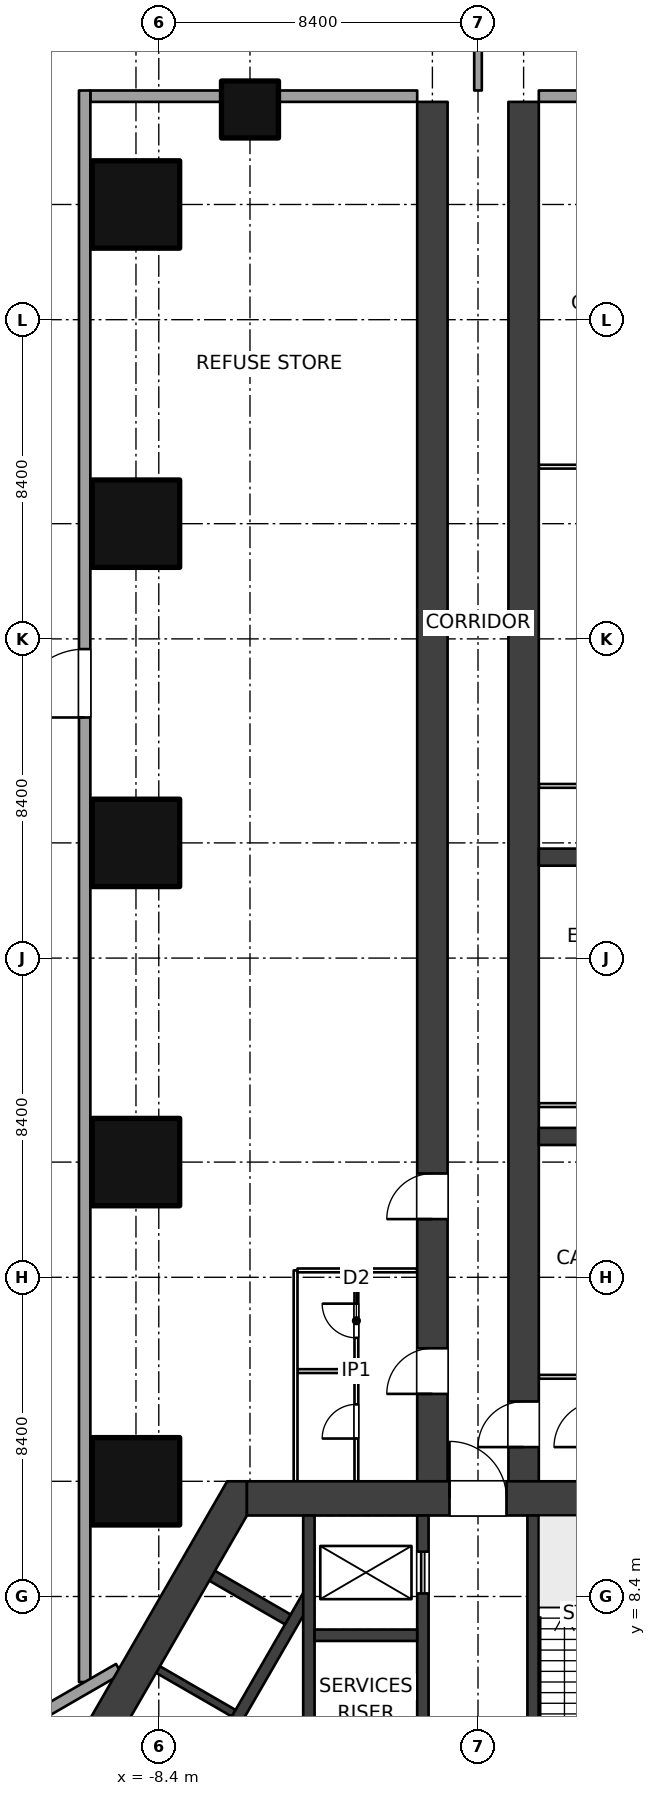
"""IFC4 building model, lengths in metres.
Left out: names, types, materials, properties, quantities, classifications, styles, units other than length and angle.
Written with IfcOpenShell. Run it as: python <this file> out.ifc"""

import sys

from ifc_helpers import new_model, si_unit, direction, frame, frame_2d, origin, origin_2d, place, context, subcontext, project, spatial, polyline, rectangle, outline, extrude, element, fill, save


model = new_model("IFC4")
c1 = context("Model", 3, precision=1e-05, world=origin(), true_north=direction((0.0, 1.0)))
c2 = subcontext(c1, "Body", "Model", "MODEL_VIEW")
j1 = project(units=[si_unit("LENGTHUNIT", "METRE"), si_unit("PLANEANGLEUNIT", "RADIAN")], contexts=[c1])
p1 = place(None, origin())
s1 = spatial("IfcSite", under=j1, at=p1, CompositionType="ELEMENT")
p2 = place(p1, origin())
s2 = spatial("IfcBuilding", under=s1, at=p2, CompositionType="ELEMENT")
p3 = place(p2, frame((0.0, 0.0, -3.5)))
s3 = spatial("IfcBuildingStorey", under=s2, at=p3, CompositionType="ELEMENT", Elevation=-3.5)
for number, where, z_axis, x_axis in (
    (1, (-9.0, 11.432, 0.0), (0.0, 0.0, 1.0), (1.0, 0.0, 0.0)),
    (2, (-9.0, 19.832, 0.0), (0.0, 0.0, 1.0), (1.0, 0.0, 0.0)),
    (3, (-9.0, 28.231, 0.0), (0.0, 0.0, 1.0), (1.0, 0.0, 0.0)),
    (4, (-9.0, 36.632, 0.0), (0.0, 0.0, 1.0), (1.0, 0.0, 0.0)),
    (5, (-9.0, 45.031, 0.0), (0.0, 0.0, 1.0), (1.0, 0.0, 0.0)),
):
    element("IfcColumn", number, at=place(p3, frame(where, z_axis=z_axis, x_axis=x_axis)), inside=s3, PredefinedType="COLUMN", context=c2, shape_type="SweptSolid", body=[
        extrude(rectangle(XDim=2.3, YDim=2.3, at=origin_2d()), origin(), (0.0, 0.0, 1.0), 3.5),
    ])
p4 = place(p3, frame((-6.0, 47.531, 0.0), z_axis=(0.0, 0.0, 1.0), x_axis=(1.0, 0.0, 0.0)))
e6 = element("IfcColumn", 6, at=p4, inside=s3, PredefinedType="COLUMN", context=c2, shape_type="SweptSolid", body=[
    extrude(rectangle(XDim=1.5, YDim=1.5, at=origin_2d()), origin(), (0.0, 0.0, 1.0), 3.5),
])
p5 = place(p3, frame((-6.08, 10.981, 0.0), z_axis=(0.0, 0.0, 1.0), x_axis=(1.0, 0.0, 0.0)))
e7 = element("IfcWall", 7, at=p5, inside=s3, PredefinedType="SHEAR", context=c2, shape_type="SweptSolid", body=[
    extrude(rectangle(XDim=12.161, YDim=0.9, at=frame_2d((6.08, 0.0))), origin(), (0.0, 0.0, 1.0), 3.5),
])
p6 = place(p5, frame((5.33, 0.0, 0.0)))
e8 = element("IfcOpeningElement", 8, at=p6, cuts=e7, PredefinedType="OPENING", context=c2, shape_type="SweptSolid", body=[
    extrude(rectangle(XDim=1.5, YDim=2.1, at=frame_2d((0.75, 1.05))), frame((0.0, 0.46, 0.0), z_axis=(0.0, -1.0, 0.0), x_axis=(1.0, 0.0, 0.0)), (0.0, 0.0, 1.0), 0.92),
])
p7 = place(p3, origin())
e9 = element("IfcWall", 9, at=p7, inside=s3, PredefinedType="SHEAR", context=c2, shape_type="SweptSolid", body=[
    extrude(outline(polyline([(-6.6, 11.432), (-13.2, 0.0), (-12.94, -0.45), (-12.161, 0.0), (-6.08, 10.531), (-6.08, 11.432), (-6.6, 11.432)])), origin(), (0.0, 0.0, 1.0), 3.5),
])
p8 = place(p3, frame((1.45, 3.63, 0.0), z_axis=(0.0, 0.0, 1.0), x_axis=(0.0, 1.0, 0.0)))
e10 = element("IfcWall", 10, at=p8, inside=s3, PredefinedType="SHEAR", context=c2, shape_type="SweptSolid", body=[
    extrude(rectangle(XDim=6.902, YDim=0.3, at=frame_2d((3.451, 0.0))), origin(), (0.0, 0.0, 1.0), 3.5),
])
p9 = place(p8, frame((0.25, 0.0, 0.0)))
e11 = element("IfcOpeningElement", 11, at=p9, cuts=e10, PredefinedType="OPENING", context=c2, shape_type="SweptSolid", body=[
    extrude(rectangle(XDim=1.0, YDim=2.1, at=frame_2d((0.5, 1.05))), frame((0.0, 0.16, 0.0), z_axis=(0.0, -1.0, 0.0), x_axis=(1.0, 0.0, 0.0)), (0.0, 0.0, 1.0), 0.32),
])
p10 = place(p3, frame((-1.45, 3.63, 0.0), z_axis=(0.0, 0.0, 1.0), x_axis=(0.0, 1.0, 0.0)))
e12 = element("IfcWall", 12, at=p10, inside=s3, PredefinedType="SHEAR", context=c2, shape_type="SweptSolid", body=[
    extrude(rectangle(XDim=6.902, YDim=0.3, at=frame_2d((3.451, 0.0))), origin(), (0.0, 0.0, 1.0), 3.5),
])
p11 = place(p10, frame((4.85, 0.0, 0.0)))
e13 = element("IfcOpeningElement", 13, at=p11, cuts=e12, PredefinedType="OPENING", context=c2, shape_type="SweptSolid", body=[
    extrude(rectangle(XDim=1.1, YDim=2.1, at=frame_2d((0.55, 1.05))), frame((0.0, 0.16, 0.0), z_axis=(0.0, -1.0, 0.0), x_axis=(1.0, 0.0, 0.0)), (0.0, 0.0, 1.0), 0.32),
])
p12 = place(p3, frame((-4.45, 3.63, 0.0), z_axis=(0.0, 0.0, 1.0), x_axis=(0.0, 1.0, 0.0)))
e14 = element("IfcWall", 14, at=p12, inside=s3, PredefinedType="SHEAR", context=c2, shape_type="SweptSolid", body=[
    extrude(rectangle(XDim=6.902, YDim=0.3, at=frame_2d((3.451, 0.0))), origin(), (0.0, 0.0, 1.0), 3.5),
])
p13 = place(p3, frame((-4.3, 7.38, 0.0), z_axis=(0.0, 0.0, 1.0), x_axis=(1.0, 0.0, 0.0)))
e15 = element("IfcWall", 15, at=p13, inside=s3, PredefinedType="SHEAR", context=c2, shape_type="SweptSolid", body=[
    extrude(rectangle(XDim=2.7, YDim=0.3, at=frame_2d((1.35, 0.0))), origin(), (0.0, 0.0, 1.0), 3.5),
])
p14 = place(p3, frame((-9.548, -0.374, 0.0), z_axis=(0.0, 0.0, 1.0), x_axis=(0.500002290144, 0.866024081565, 0.0)))
e16 = element("IfcWall", 16, at=p14, inside=s3, PredefinedType="SHEAR", context=c2, shape_type="SweptSolid", body=[
    extrude(rectangle(XDim=10.195, YDim=0.3, at=frame_2d((5.098, 0.0))), origin(), (0.0, 0.0, 1.0), 3.5),
])
p15 = place(p3, frame((-5.004, 7.796, 0.0), z_axis=(0.0, 0.0, 1.0), x_axis=(-0.866053019151, 0.499952165731, 0.0)))
e17 = element("IfcWall", 17, at=p15, inside=s3, PredefinedType="SHEAR", context=c2, shape_type="SweptSolid", body=[
    extrude(rectangle(XDim=2.3, YDim=0.3, at=frame_2d((1.15, 0.0))), origin(), (0.0, 0.0, 1.0), 3.5),
])
p16 = place(p3, frame((-6.429, 5.328, 0.0), z_axis=(0.0, 0.0, 1.0), x_axis=(-0.866007057882, 0.500031774688, 0.0)))
e18 = element("IfcWall", 18, at=p16, inside=s3, PredefinedType="SHEAR", context=c2, shape_type="SweptSolid", body=[
    extrude(rectangle(XDim=2.3, YDim=0.2, at=frame_2d((1.15, 0.0))), origin(), (0.0, 0.0, 1.0), 3.5),
])
p17 = place(p3, frame((-1.2, 10.981, 0.0), z_axis=(0.0, 0.0, 1.0), x_axis=(0.0, 1.0, 0.0)))
e19 = element("IfcWall", 19, at=p17, inside=s3, PredefinedType="SHEAR", context=c2, shape_type="SweptSolid", body=[
    extrude(rectangle(XDim=36.75, YDim=0.8, at=frame_2d((18.375, 0.0))), origin(), (0.0, 0.0, 1.0), 3.5),
])
p18 = place(p17, frame((2.75, 0.0, 0.0)))
e20 = element("IfcOpeningElement", 20, at=p18, cuts=e19, PredefinedType="OPENING", context=c2, shape_type="SweptSolid", body=[
    extrude(rectangle(XDim=1.2, YDim=2.1, at=frame_2d((0.6, 1.05))), frame((0.0, 0.41, 0.0), z_axis=(0.0, -1.0, 0.0), x_axis=(1.0, 0.0, 0.0)), (0.0, 0.0, 1.0), 0.82),
])
p19 = place(p17, frame((7.35, 0.0, 0.0)))
e21 = element("IfcOpeningElement", 21, at=p19, cuts=e19, PredefinedType="OPENING", context=c2, shape_type="SweptSolid", body=[
    extrude(rectangle(XDim=1.2, YDim=2.1, at=frame_2d((0.6, 1.05))), frame((0.0, 0.41, 0.0), z_axis=(0.0, -1.0, 0.0), x_axis=(1.0, 0.0, 0.0)), (0.0, 0.0, 1.0), 0.82),
])
p20 = place(p3, frame((1.2, 10.981, 0.0), z_axis=(0.0, 0.0, 1.0), x_axis=(0.0, 1.0, 0.0)))
e22 = element("IfcWall", 22, at=p20, inside=s3, PredefinedType="SHEAR", context=c2, shape_type="SweptSolid", body=[
    extrude(rectangle(XDim=36.75, YDim=0.8, at=frame_2d((18.375, 0.0))), origin(), (0.0, 0.0, 1.0), 3.5),
])
p21 = place(p20, frame((1.35, 0.0, 0.0)))
e23 = element("IfcOpeningElement", 23, at=p21, cuts=e22, PredefinedType="OPENING", context=c2, shape_type="SweptSolid", body=[
    extrude(rectangle(XDim=1.2, YDim=2.1, at=frame_2d((0.6, 1.05))), frame((0.0, 0.41, 0.0), z_axis=(0.0, -1.0, 0.0), x_axis=(1.0, 0.0, 0.0)), (0.0, 0.0, 1.0), 0.82),
])
p22 = place(p3, frame((-3.2, 11.432, 0.0), z_axis=(0.0, 0.0, 1.0), x_axis=(0.0, 1.0, 0.0)))
e24 = element("IfcWall", 24, at=p22, inside=s3, PredefinedType="PARTITIONING", context=c2, shape_type="SweptSolid", body=[
    extrude(rectangle(XDim=5.6, YDim=0.1, at=frame_2d((2.8, 0.0))), origin(), (0.0, 0.0, 1.0), 3.15),
])
p23 = place(p22, frame((1.125, 0.0, 0.0)))
e25 = element("IfcOpeningElement", 25, at=p23, cuts=e24, PredefinedType="OPENING", context=c2, shape_type="SweptSolid", body=[
    extrude(rectangle(XDim=0.9, YDim=2.1, at=frame_2d((0.45, 1.05))), frame((0.0, 0.06, 0.0), z_axis=(0.0, -1.0, 0.0), x_axis=(1.0, 0.0, 0.0)), (0.0, 0.0, 1.0), 0.12),
])
p24 = place(p22, frame((3.775, 0.0, 0.0)))
e26 = element("IfcOpeningElement", 26, at=p24, cuts=e24, PredefinedType="OPENING", context=c2, shape_type="SweptSolid", body=[
    extrude(rectangle(XDim=0.9, YDim=2.1, at=frame_2d((0.45, 1.05))), frame((0.0, 0.06, 0.0), z_axis=(0.0, -1.0, 0.0), x_axis=(1.0, 0.0, 0.0)), (0.0, 0.0, 1.0), 0.12),
])
p25 = place(p3, frame((-3.25, 14.332, 0.0), z_axis=(0.0, 0.0, 1.0), x_axis=(-1.0, 0.0, 0.0)))
e27 = element("IfcWall", 27, at=p25, inside=s3, PredefinedType="PARTITIONING", context=c2, shape_type="SweptSolid", body=[
    extrude(rectangle(XDim=1.5, YDim=0.1, at=frame_2d((0.75, 0.0))), origin(), (0.0, 0.0, 1.0), 3.15),
])
p26 = place(p3, frame((-4.8, 11.432, 0.0), z_axis=(0.0, 0.0, 1.0), x_axis=(0.0, 1.0, 0.0)))
e28 = element("IfcWall", 28, at=p26, inside=s3, PredefinedType="PARTITIONING", context=c2, shape_type="SweptSolid", body=[
    extrude(rectangle(XDim=5.55, YDim=0.1, at=frame_2d((2.775, 0.0))), origin(), (0.0, 0.0, 1.0), 3.15),
])
p27 = place(p3, frame((-1.6, 16.981, 0.0), z_axis=(0.0, 0.0, 1.0), x_axis=(-1.0, 0.0, 0.0)))
e29 = element("IfcWall", 29, at=p27, inside=s3, PredefinedType="PARTITIONING", context=c2, shape_type="SweptSolid", body=[
    extrude(rectangle(XDim=3.15, YDim=0.1, at=frame_2d((1.575, 0.0))), origin(), (0.0, 0.0, 1.0), 3.15),
])
p28 = place(p3, frame((1.6, 14.182, 0.0), z_axis=(0.0, 0.0, 1.0), x_axis=(1.0, 0.0, 0.0)))
e30 = element("IfcWall", 30, at=p28, inside=s3, PredefinedType="PARTITIONING", context=c2, shape_type="SweptSolid", body=[
    extrude(rectangle(XDim=1.55, YDim=0.1, at=frame_2d((0.775, 0.0))), origin(), (0.0, 0.0, 1.0), 3.15),
])
p29 = place(p3, frame((1.6, 21.332, 0.0), z_axis=(0.0, 0.0, 1.0), x_axis=(1.0, 0.0, 0.0)))
e31 = element("IfcWall", 31, at=p29, inside=s3, PredefinedType="PARTITIONING", context=c2, shape_type="SweptSolid", body=[
    extrude(rectangle(XDim=8.6, YDim=0.1, at=frame_2d((4.3, 0.0))), origin(), (0.0, 0.0, 1.0), 3.15),
])
p30 = place(p29, frame((3.525, 0.0, 0.0)))
e32 = element("IfcOpeningElement", 32, at=p30, cuts=e31, PredefinedType="OPENING", context=c2, shape_type="SweptSolid", body=[
    extrude(rectangle(XDim=1.2, YDim=2.1, at=frame_2d((0.6, 1.05))), frame((0.0, 0.06, 0.0), z_axis=(0.0, -1.0, 0.0), x_axis=(1.0, 0.0, 0.0)), (0.0, 0.0, 1.0), 0.12),
])
p31 = place(p3, frame((1.6, 29.731, 0.0), z_axis=(0.0, 0.0, 1.0), x_axis=(1.0, 0.0, 0.0)))
e33 = element("IfcWall", 33, at=p31, inside=s3, PredefinedType="PARTITIONING", context=c2, shape_type="SweptSolid", body=[
    extrude(rectangle(XDim=8.6, YDim=0.1, at=frame_2d((4.3, 0.0))), origin(), (0.0, 0.0, 1.0), 3.15),
])
p32 = place(p31, frame((2.525, 0.0, 0.0)))
e34 = element("IfcOpeningElement", 34, at=p32, cuts=e33, PredefinedType="OPENING", context=c2, shape_type="SweptSolid", body=[
    extrude(rectangle(XDim=1.2, YDim=2.1, at=frame_2d((0.6, 1.05))), frame((0.0, 0.06, 0.0), z_axis=(0.0, -1.0, 0.0), x_axis=(1.0, 0.0, 0.0)), (0.0, 0.0, 1.0), 0.12),
])
p33 = place(p3, frame((1.6, 38.132, 0.0), z_axis=(0.0, 0.0, 1.0), x_axis=(1.0, 0.0, 0.0)))
e35 = element("IfcWall", 35, at=p33, inside=s3, PredefinedType="PARTITIONING", context=c2, shape_type="SweptSolid", body=[
    extrude(rectangle(XDim=8.6, YDim=0.1, at=frame_2d((4.3, 0.0))), origin(), (0.0, 0.0, 1.0), 3.15),
])
p34 = place(p33, frame((2.525, 0.0, 0.0)))
e36 = element("IfcOpeningElement", 36, at=p34, cuts=e35, PredefinedType="OPENING", context=c2, shape_type="SweptSolid", body=[
    extrude(rectangle(XDim=1.2, YDim=2.1, at=frame_2d((0.6, 1.05))), frame((0.0, 0.06, 0.0), z_axis=(0.0, -1.0, 0.0), x_axis=(1.0, 0.0, 0.0)), (0.0, 0.0, 1.0), 0.12),
])
p35 = place(p3, frame((0.0, 48.031, 0.0), z_axis=(0.0, 0.0, 1.0), x_axis=(0.0, 1.0, 0.0)))
e37 = element("IfcWall", 37, at=p35, inside=s3, PredefinedType="SOLIDWALL", context=c2, shape_type="SweptSolid", body=[
    extrude(rectangle(XDim=2.769, YDim=0.2, at=frame_2d((1.384, 0.0))), origin(), (0.0, 0.0, 1.0), 3.15),
])
for number, where, z_axis, x_axis in (
    (38, (-1.6, 47.882, 0.0), (0.0, 0.0, 1.0), (-1.0, 0.0, 0.0)),
    (39, (1.6, 47.882, 0.0), (0.0, 0.0, 1.0), (1.0, 0.0, 0.0)),
):
    element("IfcWall", number, at=place(p3, frame(where, z_axis=z_axis, x_axis=x_axis)), inside=s3, PredefinedType="SOLIDWALL", context=c2, shape_type="SweptSolid", body=[
        extrude(rectangle(XDim=8.6, YDim=0.3, at=frame_2d((4.3, 0.0))), origin(), (0.0, 0.0, 1.0), 1.55),
    ])
p36 = place(p3, frame((-10.35, 6.149, 0.0), z_axis=(0.0, 0.0, 1.0), x_axis=(0.0, 1.0, 0.0)))
e40 = element("IfcWall", 40, at=p36, inside=s3, PredefinedType="SOLIDWALL", context=c2, shape_type="SweptSolid", body=[
    extrude(rectangle(XDim=41.883, YDim=0.3, at=frame_2d((20.941, 0.0))), origin(), (0.0, 0.0, 1.0), 3.15),
])
p37 = place(p36, frame((25.383, 0.0, 0.0)))
e41 = element("IfcOpeningElement", 41, at=p37, cuts=e40, PredefinedType="OPENING", context=c2, shape_type="SweptSolid", body=[
    extrude(rectangle(XDim=1.8, YDim=2.4, at=frame_2d((0.9, 1.2))), frame((0.0, 0.16, 0.0), z_axis=(0.0, -1.0, 0.0), x_axis=(1.0, 0.0, 0.0)), (0.0, 0.0, 1.0), 0.32),
])
p38 = place(p3, frame((-9.45, 6.495, 0.0), z_axis=(0.0, 0.0, 1.0), x_axis=(-0.866025301493, -0.500000177174, 0.0)))
e42 = element("IfcWall", 42, at=p38, inside=s3, PredefinedType="SOLIDWALL", context=c2, shape_type="SweptSolid", body=[
    extrude(rectangle(XDim=43.095, YDim=0.3, at=frame_2d((21.548, 0.0))), origin(), (0.0, 0.0, 1.0), 3.15),
])
p39 = place(p38, frame((26.595, 0.0, 0.0)))
e43 = element("IfcOpeningElement", 43, at=p39, cuts=e42, PredefinedType="OPENING", context=c2, shape_type="SweptSolid", body=[
    extrude(rectangle(XDim=1.8, YDim=2.4, at=frame_2d((0.9, 1.2))), frame((0.0, 0.16, 0.0), z_axis=(0.0, -1.0, 0.0), x_axis=(1.0, 0.0, 0.0)), (0.0, 0.0, 1.0), 0.32),
])
for number, where, z_axis, x_axis in (
    (44, (1.6, 20.507, 0.0), (0.0, 0.0, 1.0), (1.0, 0.0, 0.0)),
    (45, (1.6, 27.856, 0.0), (0.0, 0.0, 1.0), (1.0, 0.0, 0.0)),
):
    element("IfcWall", number, at=place(p3, frame(where, z_axis=z_axis, x_axis=x_axis)), inside=s3, PredefinedType="SOLIDWALL", context=c2, shape_type="SweptSolid", body=[
        extrude(rectangle(XDim=3.3, YDim=0.45, at=frame_2d((1.65, 0.0))), origin(), (0.0, 0.0, 1.0), 3.5),
    ])
p40 = place(p11, origin())
e46 = element("IfcDoor", 46, at=p40, inside=s3, OperationType="DOUBLE_DOOR_SLIDING", PredefinedType="DOOR", context=c2, shape_type="SweptSolid", body=[
    extrude(rectangle(XDim=1.1, YDim=2.1, at=frame_2d((0.55, 1.05))), frame((0.0, 0.025, 0.0), z_axis=(0.0, -1.0, 0.0), x_axis=(1.0, 0.0, 0.0)), (0.0, 0.0, 1.0), 0.05),
])
fill(e13, e46)
p41 = place(p6, origin())
e47 = element("IfcDoor", 47, at=p41, inside=s3, OperationType="DOUBLE_DOOR_DOUBLE_SWING", PredefinedType="DOOR", context=c2, shape_type="SweptSolid", body=[
    extrude(rectangle(XDim=1.5, YDim=2.1, at=frame_2d((0.75, 1.05))), frame((0.0, 0.025, 0.0), z_axis=(0.0, -1.0, 0.0), x_axis=(1.0, 0.0, 0.0)), (0.0, 0.0, 1.0), 0.05),
])
fill(e8, e47)
p42 = place(p23, origin())
e48 = element("IfcDoor", 48, at=p42, inside=s3, OperationType="SINGLE_SWING_LEFT", PredefinedType="DOOR", context=c2, shape_type="SweptSolid", body=[
    extrude(rectangle(XDim=0.9, YDim=2.1, at=frame_2d((0.45, 1.05))), frame((0.0, 0.025, 0.0), z_axis=(0.0, -1.0, 0.0), x_axis=(1.0, 0.0, 0.0)), (0.0, 0.0, 1.0), 0.05),
])
fill(e25, e48)
p43 = place(p24, origin())
e49 = element("IfcDoor", 49, at=p43, inside=s3, OperationType="SINGLE_SWING_RIGHT", PredefinedType="DOOR", context=c2, shape_type="SweptSolid", body=[
    extrude(rectangle(XDim=0.9, YDim=2.1, at=frame_2d((0.45, 1.05))), frame((0.0, 0.025, 0.0), z_axis=(0.0, -1.0, 0.0), x_axis=(1.0, 0.0, 0.0)), (0.0, 0.0, 1.0), 0.05),
])
fill(e26, e49)
p44 = place(p18, origin())
e50 = element("IfcDoor", 50, at=p44, inside=s3, OperationType="DOUBLE_SWING_LEFT", PredefinedType="DOOR", context=c2, shape_type="SweptSolid", body=[
    extrude(rectangle(XDim=1.2, YDim=2.1, at=frame_2d((0.6, 1.05))), frame((0.0, 0.025, 0.0), z_axis=(0.0, -1.0, 0.0), x_axis=(1.0, 0.0, 0.0)), (0.0, 0.0, 1.0), 0.05),
])
fill(e20, e50)
p45 = place(p19, origin())
e51 = element("IfcDoor", 51, at=p45, inside=s3, OperationType="DOUBLE_SWING_LEFT", PredefinedType="DOOR", context=c2, shape_type="SweptSolid", body=[
    extrude(rectangle(XDim=1.2, YDim=2.1, at=frame_2d((0.6, 1.05))), frame((0.0, 0.025, 0.0), z_axis=(0.0, -1.0, 0.0), x_axis=(1.0, 0.0, 0.0)), (0.0, 0.0, 1.0), 0.05),
])
fill(e21, e51)
p46 = place(p21, origin())
e52 = element("IfcDoor", 52, at=p46, inside=s3, OperationType="DOUBLE_SWING_LEFT", PredefinedType="DOOR", context=c2, shape_type="SweptSolid", body=[
    extrude(rectangle(XDim=1.2, YDim=2.1, at=frame_2d((0.6, 1.05))), frame((0.0, 0.025, 0.0), z_axis=(0.0, -1.0, 0.0), x_axis=(1.0, 0.0, 0.0)), (0.0, 0.0, 1.0), 0.05),
])
fill(e23, e52)
p47 = place(p37, origin())
e53 = element("IfcDoor", 53, at=p47, inside=s3, OperationType="DOUBLE_DOOR_DOUBLE_SWING", PredefinedType="DOOR", context=c2, shape_type="SweptSolid", body=[
    extrude(rectangle(XDim=1.8, YDim=2.4, at=frame_2d((0.9, 1.2))), frame((0.0, 0.025, 0.0), z_axis=(0.0, -1.0, 0.0), x_axis=(1.0, 0.0, 0.0)), (0.0, 0.0, 1.0), 0.05),
])
fill(e41, e53)
save(model, sys.argv[1])
